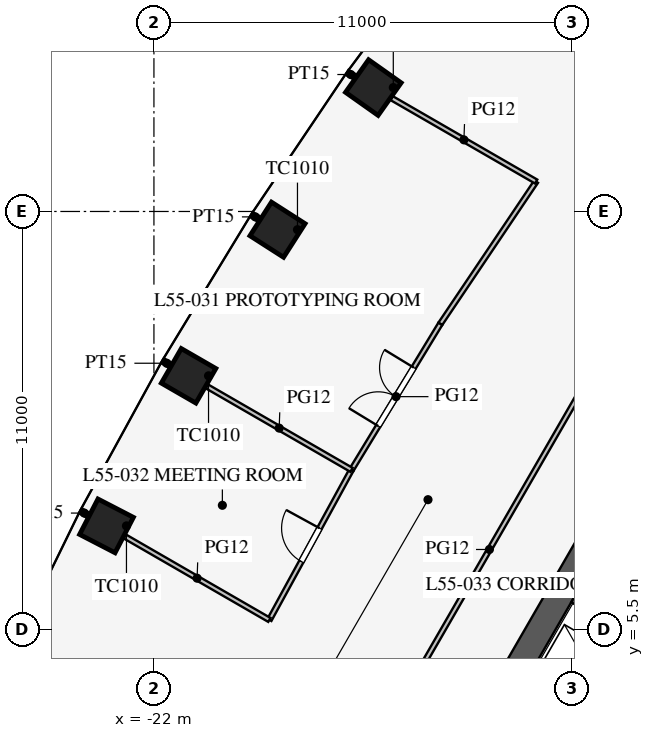
"""IFC4 building model, lengths in metres.
Left out: names, types, materials, properties, quantities, classifications, styles, units other than length and angle.
Written with IfcOpenShell. Run it as: python <this file> out.ifc"""

import sys

from ifc_helpers import new_model, si_unit, direction, frame, frame_2d, origin, origin_2d, place, context, subcontext, project, spatial, rectangle, extrude, element, fill, save


model = new_model("IFC4")
c1 = context("Model", 3, precision=1e-05, world=origin(), true_north=direction((0.0, 1.0)))
c2 = subcontext(c1, "Body", "Model", "MODEL_VIEW")
j1 = project(units=[si_unit("LENGTHUNIT", "METRE"), si_unit("PLANEANGLEUNIT", "RADIAN")], contexts=[c1])
p1 = place(None, origin())
s1 = spatial("IfcSite", under=j1, at=p1, CompositionType="ELEMENT")
p2 = place(p1, origin())
s2 = spatial("IfcBuilding", under=s1, at=p2, CompositionType="ELEMENT")
p3 = place(p2, frame((0.0, 0.0, 240.1)))
s3 = spatial("IfcBuildingStorey", under=s2, at=p3, CompositionType="ELEMENT", Elevation=240.1)
for number, where, z_axis, x_axis in (
    (1, (-16.227, 19.761, 0.0), (0.0, 0.0, 1.0), (-0.577, -0.816, 0.0)),
    (2, (-18.748, 16.02, 0.0), (0.0, 0.0, 1.0), (-0.539, -0.842, 0.0)),
    (3, (-21.088, 12.175, 0.0), (0.0, 0.0, 1.0), (-0.5, -0.866, 0.0)),
    (4, (-23.248, 8.226, 0.0), (0.0, 0.0, 1.0), (-0.46, -0.888, 0.0)),
    (5, (-25.227, 4.172, 0.0), (0.0, 0.0, 1.0), (-0.418, -0.908, 0.0)),
):
    element("IfcColumn", number, at=place(p3, frame(where, z_axis=z_axis, x_axis=x_axis)), inside=s3, PredefinedType="COLUMN", context=c2, shape_type="SweptSolid", body=[
        extrude(rectangle(XDim=1.05, YDim=1.05, at=origin_2d()), origin(), (0.0, 0.0, 1.0), 4.2),
    ])
p4 = place(p3, frame((-5.773, 16.0, 0.0), z_axis=(0.0, 0.0, 1.0), x_axis=(-0.500002442456, -0.866023993627, 0.0)))
e6 = element("IfcWall", 6, at=p4, inside=s3, PredefinedType="SHEAR", context=c2, shape_type="SweptSolid", body=[
    extrude(rectangle(XDim=21.939, YDim=0.7, at=frame_2d((10.97, 0.0))), origin(), (0.0, 0.0, 1.0), 4.2),
])
p5 = place(p4, frame((17.27, 0.0, 0.0)))
e7 = element("IfcOpeningElement", 7, at=p5, cuts=e6, PredefinedType="OPENING", context=c2, shape_type="SweptSolid", body=[
    extrude(rectangle(XDim=1.2, YDim=2.1, at=frame_2d((0.6, 1.05))), frame((0.0, 0.36, 0.0), z_axis=(0.0, -1.0, 0.0), x_axis=(1.0, 0.0, 0.0)), (0.0, 0.0, 1.0), 0.72),
])
p6 = place(p4, frame((3.47, 0.0, 0.0)))
e8 = element("IfcOpeningElement", 8, at=p6, cuts=e6, PredefinedType="OPENING", context=c2, shape_type="SweptSolid", body=[
    extrude(rectangle(XDim=1.2, YDim=2.1, at=frame_2d((0.6, 1.05))), frame((0.0, 0.36, 0.0), z_axis=(0.0, -1.0, 0.0), x_axis=(1.0, 0.0, 0.0)), (0.0, 0.0, 1.0), 0.72),
])
p7 = place(p3, frame((-5.724, 9.886, 0.0), z_axis=(0.0, 0.0, 1.0), x_axis=(-0.500001763848, -0.866024385424, 0.0)))
e9 = element("IfcWall", 9, at=p7, inside=s3, PredefinedType="SHEAR", context=c2, shape_type="SweptSolid", body=[
    extrude(rectangle(XDim=11.4, YDim=0.25, at=frame_2d((5.7, 0.0))), origin(), (0.0, 0.0, 1.0), 4.2),
])
p8 = place(p7, frame((6.525, 0.0, 0.0)))
e10 = element("IfcOpeningElement", 10, at=p8, cuts=e9, PredefinedType="OPENING", context=c2, shape_type="SweptSolid", body=[
    extrude(rectangle(XDim=1.2, YDim=2.2, at=frame_2d((0.6, 1.1))), frame((0.0, 0.135, 0.0), z_axis=(0.0, -1.0, 0.0), x_axis=(1.0, 0.0, 0.0)), (0.0, 0.0, 1.0), 0.27),
])
p9 = place(p7, frame((9.375, 0.0, 0.0)))
e11 = element("IfcOpeningElement", 11, at=p9, cuts=e9, PredefinedType="OPENING", context=c2, shape_type="SweptSolid", body=[
    extrude(rectangle(XDim=1.2, YDim=2.2, at=frame_2d((0.6, 1.1))), frame((0.0, 0.135, 0.0), z_axis=(0.0, -1.0, 0.0), x_axis=(1.0, 0.0, 0.0)), (0.0, 0.0, 1.0), 0.27),
])
p10 = place(p3, frame((-8.682, 5.012, 0.0), z_axis=(0.0, 0.0, 1.0), x_axis=(-0.866036909293, 0.499980071345, 0.0)))
e12 = element("IfcWall", 12, at=p10, inside=s3, PredefinedType="SHEAR", context=c2, shape_type="SweptSolid", body=[
    extrude(rectangle(XDim=2.625, YDim=0.25, at=frame_2d((1.312, 0.0))), origin(), (0.0, 0.0, 1.0), 4.2),
])
p11 = place(p3, frame((-0.016, 30.392, 0.0), z_axis=(0.0, 0.0, 1.0), x_axis=(-0.500000626146, -0.866025042278, 0.0)))
e13 = element("IfcWall", 13, at=p11, inside=s3, PredefinedType="PARTITIONING", context=c2, shape_type="SweptSolid", body=[
    extrude(rectangle(XDim=52.624, YDim=0.12, at=frame_2d((26.312, 0.0))), origin(), (0.0, 0.0, 1.0), 2.9),
])
p12 = place(p11, frame((10.15, 0.0, 0.15)))
e14 = element("IfcOpeningElement", 14, at=p12, cuts=e13, PredefinedType="OPENING", context=c2, shape_type="SweptSolid", body=[
    extrude(rectangle(XDim=1.8, YDim=2.1, at=frame_2d((0.9, 1.05))), frame((0.0, 0.07, 0.0), z_axis=(0.0, -1.0, 0.0), x_axis=(1.0, 0.0, 0.0)), (0.0, 0.0, 1.0), 0.14),
])
p13 = place(p11, frame((40.65, 0.0, 0.15)))
e15 = element("IfcOpeningElement", 15, at=p13, cuts=e13, PredefinedType="OPENING", context=c2, shape_type="SweptSolid", body=[
    extrude(rectangle(XDim=1.8, YDim=2.1, at=frame_2d((0.9, 1.05))), frame((0.0, 0.07, 0.0), z_axis=(0.0, -1.0, 0.0), x_axis=(1.0, 0.0, 0.0)), (0.0, 0.0, 1.0), 0.14),
])
p14 = place(p3, frame((-21.546, 12.44, 0.0), z_axis=(0.0, 0.0, 1.0), x_axis=(-0.866032814021, 0.499987164874, 0.0)))
e16 = element("IfcWall", 16, at=p14, inside=s3, PredefinedType="PARTITIONING", context=c2, shape_type="SweptSolid", body=[
    extrude(rectangle(XDim=0.266, YDim=0.15, at=frame_2d((0.133, 0.0))), origin(), (0.0, 0.0, 1.0), 2.9),
])
for number, where, z_axis, x_axis in (
    (17, (-23.727, 8.502, 0.0), (0.0, 0.0, 1.0), (-0.866, 0.5, 0.0)),
    (18, (-19.227, 16.297, 0.0), (0.0, 0.0, 1.0), (-0.866, 0.5, 0.0)),
):
    element("IfcWall", number, at=place(p3, frame(where, z_axis=z_axis, x_axis=x_axis)), inside=s3, PredefinedType="PARTITIONING", context=c2, shape_type="SweptSolid", body=[
        extrude(rectangle(XDim=0.243, YDim=0.15, at=frame_2d((0.122, 0.0))), origin(), (0.0, 0.0, 1.0), 2.9),
    ])
p15 = place(p3, frame((-16.725, 20.048, 0.0), z_axis=(0.0, 0.0, 1.0), x_axis=(-0.866149170119, 0.499785569122, 0.0)))
e19 = element("IfcWall", 19, at=p15, inside=s3, PredefinedType="PARTITIONING", context=c2, shape_type="SweptSolid", body=[
    extrude(rectangle(XDim=0.223, YDim=0.15, at=frame_2d((0.112, 0.0))), origin(), (0.0, 0.0, 1.0), 2.9),
])
p16 = place(p3, frame((-16.802, 9.7, 0.0), z_axis=(0.0, 0.0, 1.0), x_axis=(-0.479949984371, -0.877295852322, 0.0)))
e20 = element("IfcWall", 20, at=p16, inside=s3, PredefinedType="PARTITIONING", context=c2, shape_type="SweptSolid", body=[
    extrude(rectangle(XDim=4.501, YDim=0.12, at=frame_2d((2.25, 0.0))), origin(), (0.0, 0.0, 1.0), 2.9),
])
p17 = place(p16, frame((1.75, 0.0, 0.15)))
e21 = element("IfcOpeningElement", 21, at=p17, cuts=e20, PredefinedType="OPENING", context=c2, shape_type="SweptSolid", body=[
    extrude(rectangle(XDim=1.0, YDim=2.1, at=frame_2d((0.5, 1.05))), frame((0.0, 0.07, 0.0), z_axis=(0.0, -1.0, 0.0), x_axis=(1.0, 0.0, 0.0)), (0.0, 0.0, 1.0), 0.14),
])
p18 = place(p3, frame((-14.462, 13.546, 0.0), z_axis=(0.0, 0.0, 1.0), x_axis=(-0.519790350351, -0.85429385558, 0.0)))
e22 = element("IfcWall", 22, at=p18, inside=s3, PredefinedType="PARTITIONING", context=c2, shape_type="SweptSolid", body=[
    extrude(rectangle(XDim=4.501, YDim=0.12, at=frame_2d((2.25, 0.0))), origin(), (0.0, 0.0, 1.0), 2.9),
])
p19 = place(p18, frame((1.35, 0.0, 0.15)))
e23 = element("IfcOpeningElement", 23, at=p19, cuts=e22, PredefinedType="OPENING", context=c2, shape_type="SweptSolid", body=[
    extrude(rectangle(XDim=1.8, YDim=2.1, at=frame_2d((0.9, 1.05))), frame((0.0, 0.07, 0.0), z_axis=(0.0, -1.0, 0.0), x_axis=(1.0, 0.0, 0.0)), (0.0, 0.0, 1.0), 0.14),
])
p20 = place(p3, frame((-11.943, 17.287, 0.0), z_axis=(0.0, 0.0, 1.0), x_axis=(-0.55850386778, -0.829501916619, 0.0)))
e24 = element("IfcWall", 24, at=p20, inside=s3, PredefinedType="PARTITIONING", context=c2, shape_type="SweptSolid", body=[
    extrude(rectangle(XDim=4.511, YDim=0.12, at=frame_2d((2.255, 0.0))), origin(), (0.0, 0.0, 1.0), 2.9),
])
p21 = place(p3, frame((-16.802, 9.7, 0.0), z_axis=(0.0, 0.0, 1.0), x_axis=(-0.866046828231, 0.499962889934, 0.0)))
e25 = element("IfcWall", 25, at=p21, inside=s3, PredefinedType="PARTITIONING", context=c2, shape_type="SweptSolid", body=[
    extrude(rectangle(XDim=4.395, YDim=0.12, at=frame_2d((2.197, 0.0))), origin(), (0.0, 0.0, 1.0), 2.9),
])
p22 = place(p3, frame((-18.962, 5.751, 0.0), z_axis=(0.0, 0.0, 1.0), x_axis=(-0.866025498715, 0.499999835575, 0.0)))
e26 = element("IfcWall", 26, at=p22, inside=s3, PredefinedType="PARTITIONING", context=c2, shape_type="SweptSolid", body=[
    extrude(rectangle(XDim=4.394, YDim=0.12, at=frame_2d((2.197, 0.0))), origin(), (0.0, 0.0, 1.0), 2.9),
])
p23 = place(p3, frame((-11.943, 17.287, 0.0), z_axis=(0.0, 0.0, 1.0), x_axis=(-0.86600959659, 0.500027377864, 0.0)))
e27 = element("IfcWall", 27, at=p23, inside=s3, PredefinedType="PARTITIONING", context=c2, shape_type="SweptSolid", body=[
    extrude(rectangle(XDim=4.389, YDim=0.12, at=frame_2d((2.195, 0.0))), origin(), (0.0, 0.0, 1.0), 2.9),
])
p24 = place(p19, frame((1.8, 0.0, 0.0), z_axis=(0.0, 0.0, 1.0), x_axis=(-1.0, 0.0, 0.0)))
e28 = element("IfcDoor", 28, at=p24, inside=s3, OperationType="DOUBLE_DOOR_SINGLE_SWING", PredefinedType="DOOR", context=c2, shape_type="SweptSolid", body=[
    extrude(rectangle(XDim=1.8, YDim=2.1, at=frame_2d((0.9, 1.05))), frame((0.0, 0.025, 0.0), z_axis=(0.0, -1.0, 0.0), x_axis=(1.0, 0.0, 0.0)), (0.0, 0.0, 1.0), 0.05),
])
fill(e23, e28)
p25 = place(p17, frame((1.0, 0.0, 0.0), z_axis=(0.0, 0.0, 1.0), x_axis=(-1.0, 0.0, 0.0)))
e29 = element("IfcDoor", 29, at=p25, inside=s3, OperationType="SINGLE_SWING_RIGHT", PredefinedType="DOOR", context=c2, shape_type="SweptSolid", body=[
    extrude(rectangle(XDim=1.0, YDim=2.1, at=frame_2d((0.5, 1.05))), frame((0.0, 0.025, 0.0), z_axis=(0.0, -1.0, 0.0), x_axis=(1.0, 0.0, 0.0)), (0.0, 0.0, 1.0), 0.05),
])
fill(e21, e29)
save(model, sys.argv[1])
